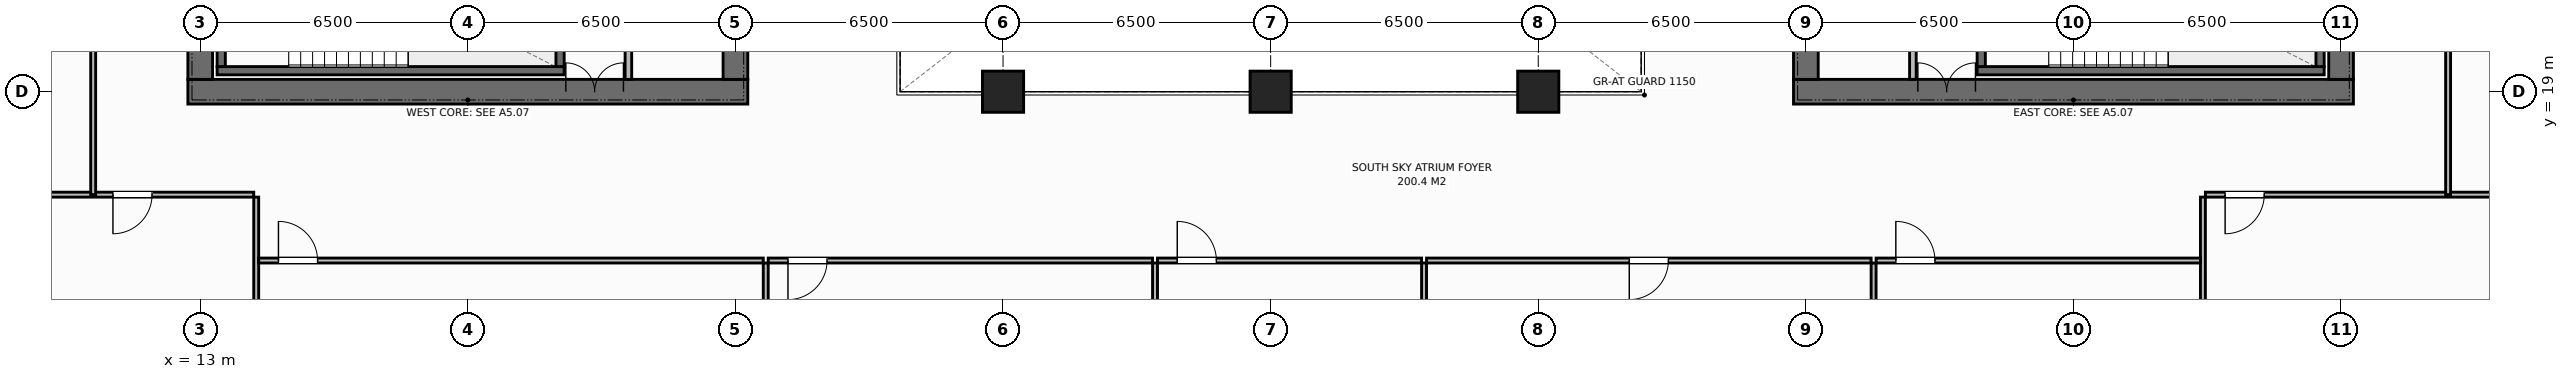
"""IFC4 building model, lengths in metres.
Left out: names, types, materials, properties, quantities, classifications, styles, units other than length and angle.
Written with IfcOpenShell. Run it as: python <this file> out.ifc"""

import sys

from ifc_helpers import new_model, si_unit, direction, frame, frame_2d, origin, origin_2d, place, context, subcontext, project, spatial, rectangle, extrude, element, fill, save


model = new_model("IFC4")
c1 = context("Model", 3, precision=1e-05, world=origin(), true_north=direction((0.0, 1.0)))
c2 = subcontext(c1, "Body", "Model", "MODEL_VIEW")
j1 = project(units=[si_unit("LENGTHUNIT", "METRE"), si_unit("PLANEANGLEUNIT", "RADIAN")], contexts=[c1])
p1 = place(None, origin())
s1 = spatial("IfcSite", under=j1, at=p1, CompositionType="ELEMENT")
p2 = place(p1, origin())
s2 = spatial("IfcBuilding", under=s1, at=p2, CompositionType="ELEMENT")
p3 = place(p2, frame((0.0, 0.0, 170.8)))
s3 = spatial("IfcBuildingStorey", under=s2, at=p3, CompositionType="ELEMENT", Elevation=170.8)
p4 = place(p3, frame((12.7, 19.0, 0.0), z_axis=(0.0, 0.0, 1.0), x_axis=(1.0, 0.0, 0.0)))
e1 = element("IfcWall", 1, at=p4, inside=s3, PredefinedType="SHEAR", context=c2, shape_type="SweptSolid", body=[
    extrude(rectangle(XDim=13.6, YDim=0.6, at=frame_2d((6.8, 0.0))), origin(), (0.0, 0.0, 1.0), 3.8),
])
p5 = place(p4, frame((9.18, 0.0, 0.0)))
e2 = element("IfcOpeningElement", 2, at=p5, cuts=e1, PredefinedType="OPENING", context=c2, shape_type="SweptSolid", body=[
    extrude(rectangle(XDim=1.4, YDim=2.2, at=frame_2d((0.7, 1.1))), frame((0.0, 0.31, 0.0), z_axis=(0.0, -1.0, 0.0), x_axis=(1.0, 0.0, 0.0)), (0.0, 0.0, 1.0), 0.62),
])
p6 = place(p3, frame((13.0, 19.3, 0.0), z_axis=(0.0, 0.0, 1.0), x_axis=(0.0, 1.0, 0.0)))
e3 = element("IfcWall", 3, at=p6, inside=s3, PredefinedType="SHEAR", context=c2, shape_type="SweptSolid", body=[
    extrude(rectangle(XDim=13.4, YDim=0.6, at=frame_2d((6.7, 0.0))), origin(), (0.0, 0.0, 1.0), 3.8),
])
p7 = place(p6, frame((4.75, 0.0, 0.0)))
e4 = element("IfcOpeningElement", 4, at=p7, cuts=e3, PredefinedType="OPENING", context=c2, shape_type="SweptSolid", body=[
    extrude(rectangle(XDim=1.4, YDim=2.2, at=frame_2d((0.7, 1.1))), frame((0.0, 0.31, 0.0), z_axis=(0.0, -1.0, 0.0), x_axis=(1.0, 0.0, 0.0)), (0.0, 0.0, 1.0), 0.62),
])
p8 = place(p3, frame((26.0, 19.3, 0.0), z_axis=(0.0, 0.0, 1.0), x_axis=(0.0, 1.0, 0.0)))
e5 = element("IfcWall", 5, at=p8, inside=s3, PredefinedType="SHEAR", context=c2, shape_type="SweptSolid", body=[
    extrude(rectangle(XDim=13.4, YDim=0.6, at=frame_2d((6.7, 0.0))), origin(), (0.0, 0.0, 1.0), 3.8),
])
p9 = place(p3, frame((51.7, 19.0, 0.0), z_axis=(0.0, 0.0, 1.0), x_axis=(1.0, 0.0, 0.0)))
e6 = element("IfcWall", 6, at=p9, inside=s3, PredefinedType="SHEAR", context=c2, shape_type="SweptSolid", body=[
    extrude(rectangle(XDim=13.6, YDim=0.6, at=frame_2d((6.8, 0.0))), origin(), (0.0, 0.0, 1.0), 3.8),
])
p10 = place(p9, frame((3.02, 0.0, 0.0)))
e7 = element("IfcOpeningElement", 7, at=p10, cuts=e6, PredefinedType="OPENING", context=c2, shape_type="SweptSolid", body=[
    extrude(rectangle(XDim=1.4, YDim=2.2, at=frame_2d((0.7, 1.1))), frame((0.0, 0.31, 0.0), z_axis=(0.0, -1.0, 0.0), x_axis=(1.0, 0.0, 0.0)), (0.0, 0.0, 1.0), 0.62),
])
p11 = place(p3, frame((52.0, 19.3, 0.0), z_axis=(0.0, 0.0, 1.0), x_axis=(0.0, 1.0, 0.0)))
e8 = element("IfcWall", 8, at=p11, inside=s3, PredefinedType="SHEAR", context=c2, shape_type="SweptSolid", body=[
    extrude(rectangle(XDim=13.4, YDim=0.6, at=frame_2d((6.7, 0.0))), origin(), (0.0, 0.0, 1.0), 3.8),
])
p12 = place(p3, frame((65.0, 19.3, 0.0), z_axis=(0.0, 0.0, 1.0), x_axis=(0.0, 1.0, 0.0)))
e9 = element("IfcWall", 9, at=p12, inside=s3, PredefinedType="SHEAR", context=c2, shape_type="SweptSolid", body=[
    extrude(rectangle(XDim=13.4, YDim=0.6, at=frame_2d((6.7, 0.0))), origin(), (0.0, 0.0, 1.0), 3.8),
])
p13 = place(p12, frame((8.15, 0.0, 0.0)))
e10 = element("IfcOpeningElement", 10, at=p13, cuts=e9, PredefinedType="OPENING", context=c2, shape_type="SweptSolid", body=[
    extrude(rectangle(XDim=1.3, YDim=2.2, at=frame_2d((0.65, 1.1))), frame((0.0, 0.31, 0.0), z_axis=(0.0, -1.0, 0.0), x_axis=(1.0, 0.0, 0.0)), (0.0, 0.0, 1.0), 0.62),
])
p14 = place(p3, frame((13.41, 19.51, 0.0), z_axis=(0.0, 0.0, 1.0), x_axis=(1.0, 0.0, 0.0)))
e11 = element("IfcWall", 11, at=p14, inside=s3, PredefinedType="SHEAR", context=c2, shape_type="SweptSolid", body=[
    extrude(rectangle(XDim=8.43, YDim=0.2, at=frame_2d((4.215, 0.0))), origin(), (0.0, 0.0, 1.0), 3.8),
])
for number, where, z_axis, x_axis in (
    (12, (13.51, 19.61, 0.0), (0.0, 0.0, 1.0), (0.0, 1.0, 0.0)),
    (13, (21.74, 19.61, 0.0), (0.0, 0.0, 1.0), (0.0, 1.0, 0.0)),
):
    element("IfcWall", number, at=place(p3, frame(where, z_axis=z_axis, x_axis=x_axis)), inside=s3, PredefinedType="SHEAR", context=c2, shape_type="SweptSolid", body=[
        extrude(rectangle(XDim=3.28, YDim=0.2, at=frame_2d((1.64, 0.0))), origin(), (0.0, 0.0, 1.0), 3.8),
    ])
p15 = place(p3, frame((56.16, 19.51, 0.0), z_axis=(0.0, 0.0, 1.0), x_axis=(1.0, 0.0, 0.0)))
e14 = element("IfcWall", 14, at=p15, inside=s3, PredefinedType="SHEAR", context=c2, shape_type="SweptSolid", body=[
    extrude(rectangle(XDim=8.43, YDim=0.2, at=frame_2d((4.215, 0.0))), origin(), (0.0, 0.0, 1.0), 3.8),
])
for number, where, z_axis, x_axis in (
    (15, (56.26, 19.61, 0.0), (0.0, 0.0, 1.0), (0.0, 1.0, 0.0)),
    (16, (64.49, 19.61, 0.0), (0.0, 0.0, 1.0), (0.0, 1.0, 0.0)),
):
    element("IfcWall", number, at=place(p3, frame(where, z_axis=z_axis, x_axis=x_axis)), inside=s3, PredefinedType="SHEAR", context=c2, shape_type="SweptSolid", body=[
        extrude(rectangle(XDim=3.28, YDim=0.2, at=frame_2d((1.64, 0.0))), origin(), (0.0, 0.0, 1.0), 3.8),
    ])
for number, where, z_axis, x_axis in (
    (17, (32.5, 19.0, 0.0), (0.0, 0.0, 1.0), (1.0, 0.0, 0.0)),
    (18, (39.0, 19.0, 0.0), (0.0, 0.0, 1.0), (1.0, 0.0, 0.0)),
    (19, (45.5, 19.0, 0.0), (0.0, 0.0, 1.0), (1.0, 0.0, 0.0)),
):
    element("IfcColumn", number, at=place(p3, frame(where, z_axis=z_axis, x_axis=x_axis)), inside=s3, PredefinedType="COLUMN", context=c2, shape_type="SweptSolid", body=[
        extrude(rectangle(XDim=1.0, YDim=1.0, at=origin_2d()), origin(), (0.0, 0.0, 1.0), 3.8),
    ])
p16 = place(p3, frame((23.4, 19.3, 0.0), z_axis=(0.0, 0.0, 1.0), x_axis=(0.0, 1.0, 0.0)))
e20 = element("IfcWall", 20, at=p16, inside=s3, PredefinedType="STANDARD", context=c2, shape_type="SweptSolid", body=[
    extrude(rectangle(XDim=13.4, YDim=0.16, at=frame_2d((6.7, 0.0))), origin(), (0.0, 0.0, 1.0), 3.572),
])
p17 = place(p16, frame((2.2, 0.0, 0.0)))
e21 = element("IfcOpeningElement", 21, at=p17, cuts=e20, PredefinedType="OPENING", context=c2, shape_type="SweptSolid", body=[
    extrude(rectangle(XDim=0.95, YDim=2.15, at=frame_2d((0.475, 1.075))), frame((0.0, 0.09, 0.0), z_axis=(0.0, -1.0, 0.0), x_axis=(1.0, 0.0, 0.0)), (0.0, 0.0, 1.0), 0.18),
])
p18 = place(p16, frame((6.3, 0.0, 0.0)))
e22 = element("IfcOpeningElement", 22, at=p18, cuts=e20, PredefinedType="OPENING", context=c2, shape_type="SweptSolid", body=[
    extrude(rectangle(XDim=0.95, YDim=2.15, at=frame_2d((0.475, 1.075))), frame((0.0, 0.09, 0.0), z_axis=(0.0, -1.0, 0.0), x_axis=(1.0, 0.0, 0.0)), (0.0, 0.0, 1.0), 0.18),
])
p19 = place(p16, frame((9.3, 0.0, 0.0)))
e23 = element("IfcOpeningElement", 23, at=p19, cuts=e20, PredefinedType="OPENING", context=c2, shape_type="SweptSolid", body=[
    extrude(rectangle(XDim=1.1, YDim=2.2, at=frame_2d((0.55, 1.1))), frame((0.0, 0.09, 0.0), z_axis=(0.0, -1.0, 0.0), x_axis=(1.0, 0.0, 0.0)), (0.0, 0.0, 1.0), 0.18),
])
p20 = place(p16, frame((11.5, 0.0, 0.0)))
e24 = element("IfcOpeningElement", 24, at=p20, cuts=e20, PredefinedType="OPENING", context=c2, shape_type="SweptSolid", body=[
    extrude(rectangle(XDim=1.1, YDim=2.2, at=frame_2d((0.55, 1.1))), frame((0.0, 0.09, 0.0), z_axis=(0.0, -1.0, 0.0), x_axis=(1.0, 0.0, 0.0)), (0.0, 0.0, 1.0), 0.18),
])
p21 = place(p3, frame((54.6, 19.3, 0.0), z_axis=(0.0, 0.0, 1.0), x_axis=(0.0, 1.0, 0.0)))
e25 = element("IfcWall", 25, at=p21, inside=s3, PredefinedType="STANDARD", context=c2, shape_type="SweptSolid", body=[
    extrude(rectangle(XDim=13.4, YDim=0.16, at=frame_2d((6.7, 0.0))), origin(), (0.0, 0.0, 1.0), 3.572),
])
p22 = place(p21, frame((2.1, 0.0, 0.0)))
e26 = element("IfcOpeningElement", 26, at=p22, cuts=e25, PredefinedType="OPENING", context=c2, shape_type="SweptSolid", body=[
    extrude(rectangle(XDim=0.95, YDim=2.15, at=frame_2d((0.475, 1.075))), frame((0.0, 0.09, 0.0), z_axis=(0.0, -1.0, 0.0), x_axis=(1.0, 0.0, 0.0)), (0.0, 0.0, 1.0), 0.18),
])
p23 = place(p21, frame((6.2, 0.0, 0.0)))
e27 = element("IfcOpeningElement", 27, at=p23, cuts=e25, PredefinedType="OPENING", context=c2, shape_type="SweptSolid", body=[
    extrude(rectangle(XDim=0.95, YDim=2.15, at=frame_2d((0.475, 1.075))), frame((0.0, 0.09, 0.0), z_axis=(0.0, -1.0, 0.0), x_axis=(1.0, 0.0, 0.0)), (0.0, 0.0, 1.0), 0.18),
])
p24 = place(p21, frame((9.3, 0.0, 0.0)))
e28 = element("IfcOpeningElement", 28, at=p24, cuts=e25, PredefinedType="OPENING", context=c2, shape_type="SweptSolid", body=[
    extrude(rectangle(XDim=1.1, YDim=2.2, at=frame_2d((0.55, 1.1))), frame((0.0, 0.09, 0.0), z_axis=(0.0, -1.0, 0.0), x_axis=(1.0, 0.0, 0.0)), (0.0, 0.0, 1.0), 0.18),
])
p25 = place(p21, frame((11.5, 0.0, 0.0)))
e29 = element("IfcOpeningElement", 29, at=p25, cuts=e25, PredefinedType="OPENING", context=c2, shape_type="SweptSolid", body=[
    extrude(rectangle(XDim=1.1, YDim=2.2, at=frame_2d((0.55, 1.1))), frame((0.0, 0.09, 0.0), z_axis=(0.0, -1.0, 0.0), x_axis=(1.0, 0.0, 0.0)), (0.0, 0.0, 1.0), 0.18),
])
p26 = place(p3, frame((14.36, 3.42, 0.0), z_axis=(0.0, 0.0, 1.0), x_axis=(0.0, 1.0, 0.0)))
e30 = element("IfcWall", 30, at=p26, inside=s3, PredefinedType="PARTITIONING", context=c2, shape_type="SweptSolid", body=[
    extrude(rectangle(XDim=13.02, YDim=0.12, at=frame_2d((6.51, 0.0))), origin(), (0.0, 0.0, 1.0), 3.572),
])
p27 = place(p3, frame((3.98, 16.5, 0.0), z_axis=(0.0, 0.0, 1.0), x_axis=(1.0, 0.0, 0.0)))
e31 = element("IfcWall", 31, at=p27, inside=s3, PredefinedType="PARTITIONING", context=c2, shape_type="SweptSolid", body=[
    extrude(rectangle(XDim=10.32, YDim=0.12, at=frame_2d((5.16, 0.0))), origin(), (0.0, 0.0, 1.0), 3.572),
])
p28 = place(p27, frame((6.9, 0.0, 0.0)))
e32 = element("IfcOpeningElement", 32, at=p28, cuts=e31, PredefinedType="OPENING", context=c2, shape_type="SweptSolid", body=[
    extrude(rectangle(XDim=0.95, YDim=2.15, at=frame_2d((0.475, 1.075))), frame((0.0, 0.07, 0.0), z_axis=(0.0, -1.0, 0.0), x_axis=(1.0, 0.0, 0.0)), (0.0, 0.0, 1.0), 0.14),
])
p29 = place(p3, frame((26.736, 3.42, 0.0), z_axis=(0.0, 0.0, 1.0), x_axis=(0.0, 1.0, 0.0)))
e33 = element("IfcWall", 33, at=p29, inside=s3, PredefinedType="PARTITIONING", context=c2, shape_type="SweptSolid", body=[
    extrude(rectangle(XDim=11.42, YDim=0.12, at=frame_2d((5.71, 0.0))), origin(), (0.0, 0.0, 1.0), 3.572),
])
p30 = place(p3, frame((14.42, 14.9, 0.0), z_axis=(0.0, 0.0, 1.0), x_axis=(1.0, 0.0, 0.0)))
e34 = element("IfcWall", 34, at=p30, inside=s3, PredefinedType="PARTITIONING", context=c2, shape_type="SweptSolid", body=[
    extrude(rectangle(XDim=12.256, YDim=0.12, at=frame_2d((6.128, 0.0))), origin(), (0.0, 0.0, 1.0), 3.572),
])
p31 = place(p30, frame((0.48, 0.0, 0.0)))
e35 = element("IfcOpeningElement", 35, at=p31, cuts=e34, PredefinedType="OPENING", context=c2, shape_type="SweptSolid", body=[
    extrude(rectangle(XDim=0.95, YDim=2.15, at=frame_2d((0.475, 1.075))), frame((0.0, 0.07, 0.0), z_axis=(0.0, -1.0, 0.0), x_axis=(1.0, 0.0, 0.0)), (0.0, 0.0, 1.0), 0.14),
])
p32 = place(p3, frame((36.191, 3.42, 0.0), z_axis=(0.0, 0.0, 1.0), x_axis=(0.0, 1.0, 0.0)))
e36 = element("IfcWall", 36, at=p32, inside=s3, PredefinedType="PARTITIONING", context=c2, shape_type="SweptSolid", body=[
    extrude(rectangle(XDim=11.42, YDim=0.12, at=frame_2d((5.71, 0.0))), origin(), (0.0, 0.0, 1.0), 3.572),
])
p33 = place(p3, frame((26.796, 14.9, 0.0), z_axis=(0.0, 0.0, 1.0), x_axis=(1.0, 0.0, 0.0)))
e37 = element("IfcWall", 37, at=p33, inside=s3, PredefinedType="PARTITIONING", context=c2, shape_type="SweptSolid", body=[
    extrude(rectangle(XDim=9.335, YDim=0.12, at=frame_2d((4.668, 0.0))), origin(), (0.0, 0.0, 1.0), 3.572),
])
p34 = place(p33, frame((0.48, 0.0, 0.0)))
e38 = element("IfcOpeningElement", 38, at=p34, cuts=e37, PredefinedType="OPENING", context=c2, shape_type="SweptSolid", body=[
    extrude(rectangle(XDim=0.95, YDim=2.15, at=frame_2d((0.475, 1.075))), frame((0.0, 0.07, 0.0), z_axis=(0.0, -1.0, 0.0), x_axis=(1.0, 0.0, 0.0)), (0.0, 0.0, 1.0), 0.14),
])
p35 = place(p3, frame((42.726, 3.42, 0.0), z_axis=(0.0, 0.0, 1.0), x_axis=(0.0, 1.0, 0.0)))
e39 = element("IfcWall", 39, at=p35, inside=s3, PredefinedType="PARTITIONING", context=c2, shape_type="SweptSolid", body=[
    extrude(rectangle(XDim=11.42, YDim=0.12, at=frame_2d((5.71, 0.0))), origin(), (0.0, 0.0, 1.0), 3.572),
])
p36 = place(p3, frame((36.251, 14.9, 0.0), z_axis=(0.0, 0.0, 1.0), x_axis=(1.0, 0.0, 0.0)))
e40 = element("IfcWall", 40, at=p36, inside=s3, PredefinedType="PARTITIONING", context=c2, shape_type="SweptSolid", body=[
    extrude(rectangle(XDim=6.415, YDim=0.12, at=frame_2d((3.207, 0.0))), origin(), (0.0, 0.0, 1.0), 3.572),
])
p37 = place(p36, frame((0.48, 0.0, 0.0)))
e41 = element("IfcOpeningElement", 41, at=p37, cuts=e40, PredefinedType="OPENING", context=c2, shape_type="SweptSolid", body=[
    extrude(rectangle(XDim=0.95, YDim=2.15, at=frame_2d((0.475, 1.075))), frame((0.0, 0.07, 0.0), z_axis=(0.0, -1.0, 0.0), x_axis=(1.0, 0.0, 0.0)), (0.0, 0.0, 1.0), 0.14),
])
p38 = place(p3, frame((53.646, 3.42, 0.0), z_axis=(0.0, 0.0, 1.0), x_axis=(0.0, 1.0, 0.0)))
e42 = element("IfcWall", 42, at=p38, inside=s3, PredefinedType="PARTITIONING", context=c2, shape_type="SweptSolid", body=[
    extrude(rectangle(XDim=11.42, YDim=0.12, at=frame_2d((5.71, 0.0))), origin(), (0.0, 0.0, 1.0), 3.572),
])
p39 = place(p3, frame((42.786, 14.9, 0.0), z_axis=(0.0, 0.0, 1.0), x_axis=(1.0, 0.0, 0.0)))
e43 = element("IfcWall", 43, at=p39, inside=s3, PredefinedType="PARTITIONING", context=c2, shape_type="SweptSolid", body=[
    extrude(rectangle(XDim=10.799, YDim=0.12, at=frame_2d((5.4, 0.0))), origin(), (0.0, 0.0, 1.0), 3.572),
])
p40 = place(p39, frame((4.925, 0.0, 0.0)))
e44 = element("IfcOpeningElement", 44, at=p40, cuts=e43, PredefinedType="OPENING", context=c2, shape_type="SweptSolid", body=[
    extrude(rectangle(XDim=0.95, YDim=2.15, at=frame_2d((0.475, 1.075))), frame((0.0, 0.07, 0.0), z_axis=(0.0, -1.0, 0.0), x_axis=(1.0, 0.0, 0.0)), (0.0, 0.0, 1.0), 0.14),
])
p41 = place(p3, frame((61.644, 3.42, 0.0), z_axis=(0.0, 0.0, 1.0), x_axis=(0.0, 1.0, 0.0)))
e45 = element("IfcWall", 45, at=p41, inside=s3, PredefinedType="PARTITIONING", context=c2, shape_type="SweptSolid", body=[
    extrude(rectangle(XDim=13.02, YDim=0.12, at=frame_2d((6.51, 0.0))), origin(), (0.0, 0.0, 1.0), 3.572),
])
p42 = place(p3, frame((53.705, 14.9, 0.0), z_axis=(0.0, 0.0, 1.0), x_axis=(1.0, 0.0, 0.0)))
e46 = element("IfcWall", 46, at=p42, inside=s3, PredefinedType="PARTITIONING", context=c2, shape_type="SweptSolid", body=[
    extrude(rectangle(XDim=7.879, YDim=0.12, at=frame_2d((3.939, 0.0))), origin(), (0.0, 0.0, 1.0), 3.572),
])
p43 = place(p42, frame((0.48, 0.0, 0.0)))
e47 = element("IfcOpeningElement", 47, at=p43, cuts=e46, PredefinedType="OPENING", context=c2, shape_type="SweptSolid", body=[
    extrude(rectangle(XDim=0.95, YDim=2.15, at=frame_2d((0.475, 1.075))), frame((0.0, 0.07, 0.0), z_axis=(0.0, -1.0, 0.0), x_axis=(1.0, 0.0, 0.0)), (0.0, 0.0, 1.0), 0.14),
])
p44 = place(p3, frame((61.704, 16.5, 0.0), z_axis=(0.0, 0.0, 1.0), x_axis=(1.0, 0.0, 0.0)))
e48 = element("IfcWall", 48, at=p44, inside=s3, PredefinedType="PARTITIONING", context=c2, shape_type="SweptSolid", body=[
    extrude(rectangle(XDim=12.316, YDim=0.12, at=frame_2d((6.158, 0.0))), origin(), (0.0, 0.0, 1.0), 3.572),
])
p45 = place(p44, frame((0.48, 0.0, 0.0)))
e49 = element("IfcOpeningElement", 49, at=p45, cuts=e48, PredefinedType="OPENING", context=c2, shape_type="SweptSolid", body=[
    extrude(rectangle(XDim=0.95, YDim=2.15, at=frame_2d((0.475, 1.075))), frame((0.0, 0.07, 0.0), z_axis=(0.0, -1.0, 0.0), x_axis=(1.0, 0.0, 0.0)), (0.0, 0.0, 1.0), 0.14),
])
p46 = place(p3, frame((10.4, 16.5, 0.0), z_axis=(0.0, 0.0, 1.0), x_axis=(0.0, 1.0, 0.0)))
e50 = element("IfcWall", 50, at=p46, inside=s3, PredefinedType="PARTITIONING", context=c2, shape_type="SweptSolid", body=[
    extrude(rectangle(XDim=19.0, YDim=0.12, at=frame_2d((9.5, 0.0))), origin(), (0.0, 0.0, 1.0), 3.572),
])
p47 = place(p46, frame((9.025, 0.0, 0.0)))
e51 = element("IfcOpeningElement", 51, at=p47, cuts=e50, PredefinedType="OPENING", context=c2, shape_type="SweptSolid", body=[
    extrude(rectangle(XDim=0.95, YDim=2.15, at=frame_2d((0.475, 1.075))), frame((0.0, 0.07, 0.0), z_axis=(0.0, -1.0, 0.0), x_axis=(1.0, 0.0, 0.0)), (0.0, 0.0, 1.0), 0.14),
])
p48 = place(p3, frame((67.6, 16.5, 0.0), z_axis=(0.0, 0.0, 1.0), x_axis=(0.0, 1.0, 0.0)))
e52 = element("IfcWall", 52, at=p48, inside=s3, PredefinedType="PARTITIONING", context=c2, shape_type="SweptSolid", body=[
    extrude(rectangle(XDim=9.5, YDim=0.12, at=frame_2d((4.75, 0.0))), origin(), (0.0, 0.0, 1.0), 3.572),
])
p49 = place(p48, frame((5.325, 0.0, 0.0)))
e53 = element("IfcOpeningElement", 53, at=p49, cuts=e52, PredefinedType="OPENING", context=c2, shape_type="SweptSolid", body=[
    extrude(rectangle(XDim=0.95, YDim=2.15, at=frame_2d((0.475, 1.075))), frame((0.0, 0.07, 0.0), z_axis=(0.0, -1.0, 0.0), x_axis=(1.0, 0.0, 0.0)), (0.0, 0.0, 1.0), 0.14),
])
p50 = place(p5, origin())
e54 = element("IfcDoor", 54, at=p50, inside=s3, OperationType="DOUBLE_DOOR_SINGLE_SWING", PredefinedType="DOOR", context=c2, shape_type="SweptSolid", body=[
    extrude(rectangle(XDim=1.4, YDim=2.2, at=frame_2d((0.7, 1.1))), frame((0.0, 0.075, 0.0), z_axis=(0.0, -1.0, 0.0), x_axis=(1.0, 0.0, 0.0)), (0.0, 0.0, 1.0), 0.05),
])
fill(e2, e54)
p51 = place(p10, origin())
e55 = element("IfcDoor", 55, at=p51, inside=s3, OperationType="DOUBLE_DOOR_SINGLE_SWING", PredefinedType="DOOR", context=c2, shape_type="SweptSolid", body=[
    extrude(rectangle(XDim=1.4, YDim=2.2, at=frame_2d((0.7, 1.1))), frame((0.0, 0.075, 0.0), z_axis=(0.0, -1.0, 0.0), x_axis=(1.0, 0.0, 0.0)), (0.0, 0.0, 1.0), 0.05),
])
fill(e7, e55)
p52 = place(p28, origin())
e56 = element("IfcDoor", 56, at=p52, inside=s3, OperationType="SINGLE_SWING_RIGHT", PredefinedType="DOOR", context=c2, shape_type="SweptSolid", body=[
    extrude(rectangle(XDim=0.95, YDim=2.15, at=frame_2d((0.475, 1.075))), frame((0.0, 0.025, 0.0), z_axis=(0.0, -1.0, 0.0), x_axis=(1.0, 0.0, 0.0)), (0.0, 0.0, 1.0), 0.05),
])
fill(e32, e56)
p53 = place(p31, origin())
e57 = element("IfcDoor", 57, at=p53, inside=s3, OperationType="SINGLE_SWING_LEFT", PredefinedType="DOOR", context=c2, shape_type="SweptSolid", body=[
    extrude(rectangle(XDim=0.95, YDim=2.15, at=frame_2d((0.475, 1.075))), frame((0.0, 0.025, 0.0), z_axis=(0.0, -1.0, 0.0), x_axis=(1.0, 0.0, 0.0)), (0.0, 0.0, 1.0), 0.05),
])
fill(e35, e57)
p54 = place(p34, origin())
e58 = element("IfcDoor", 58, at=p54, inside=s3, OperationType="SINGLE_SWING_RIGHT", PredefinedType="DOOR", context=c2, shape_type="SweptSolid", body=[
    extrude(rectangle(XDim=0.95, YDim=2.15, at=frame_2d((0.475, 1.075))), frame((0.0, 0.025, 0.0), z_axis=(0.0, -1.0, 0.0), x_axis=(1.0, 0.0, 0.0)), (0.0, 0.0, 1.0), 0.05),
])
fill(e38, e58)
p55 = place(p37, origin())
e59 = element("IfcDoor", 59, at=p55, inside=s3, OperationType="SINGLE_SWING_LEFT", PredefinedType="DOOR", context=c2, shape_type="SweptSolid", body=[
    extrude(rectangle(XDim=0.95, YDim=2.15, at=frame_2d((0.475, 1.075))), frame((0.0, 0.025, 0.0), z_axis=(0.0, -1.0, 0.0), x_axis=(1.0, 0.0, 0.0)), (0.0, 0.0, 1.0), 0.05),
])
fill(e41, e59)
p56 = place(p40, origin())
e60 = element("IfcDoor", 60, at=p56, inside=s3, OperationType="SINGLE_SWING_RIGHT", PredefinedType="DOOR", context=c2, shape_type="SweptSolid", body=[
    extrude(rectangle(XDim=0.95, YDim=2.15, at=frame_2d((0.475, 1.075))), frame((0.0, 0.025, 0.0), z_axis=(0.0, -1.0, 0.0), x_axis=(1.0, 0.0, 0.0)), (0.0, 0.0, 1.0), 0.05),
])
fill(e44, e60)
p57 = place(p43, origin())
e61 = element("IfcDoor", 61, at=p57, inside=s3, OperationType="SINGLE_SWING_LEFT", PredefinedType="DOOR", context=c2, shape_type="SweptSolid", body=[
    extrude(rectangle(XDim=0.95, YDim=2.15, at=frame_2d((0.475, 1.075))), frame((0.0, 0.025, 0.0), z_axis=(0.0, -1.0, 0.0), x_axis=(1.0, 0.0, 0.0)), (0.0, 0.0, 1.0), 0.05),
])
fill(e47, e61)
p58 = place(p45, origin())
e62 = element("IfcDoor", 62, at=p58, inside=s3, OperationType="SINGLE_SWING_RIGHT", PredefinedType="DOOR", context=c2, shape_type="SweptSolid", body=[
    extrude(rectangle(XDim=0.95, YDim=2.15, at=frame_2d((0.475, 1.075))), frame((0.0, 0.025, 0.0), z_axis=(0.0, -1.0, 0.0), x_axis=(1.0, 0.0, 0.0)), (0.0, 0.0, 1.0), 0.05),
])
fill(e49, e62)
save(model, sys.argv[1])
